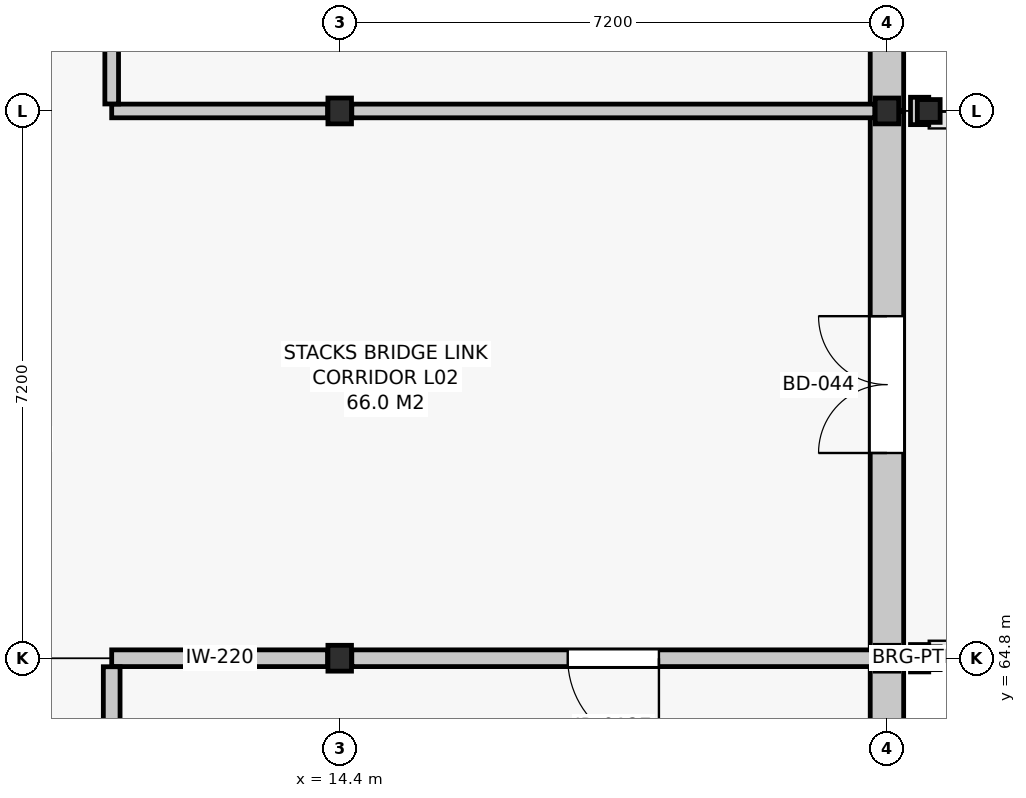
"""IFC4 building model, lengths in metres.
Left out: names, types, materials, properties, quantities, classifications, styles, units other than length and angle.
Written with IfcOpenShell. Run it as: python <this file> out.ifc"""

import sys

from ifc_helpers import new_model, si_unit, direction, frame, frame_2d, origin, origin_2d, place, context, subcontext, project, spatial, rectangle, i_section, extrude, element, fill, save


model = new_model("IFC4")
c1 = context("Model", 3, precision=1e-05, world=origin(), true_north=direction((0.0, 1.0)))
c2 = subcontext(c1, "Body", "Model", "MODEL_VIEW")
j1 = project(units=[si_unit("LENGTHUNIT", "METRE"), si_unit("PLANEANGLEUNIT", "RADIAN")], contexts=[c1])
p1 = place(None, origin())
s1 = spatial("IfcSite", under=j1, at=p1, CompositionType="ELEMENT")
p2 = place(p1, origin())
s2 = spatial("IfcBuilding", under=s1, at=p2, CompositionType="ELEMENT")
p3 = place(p2, frame((0.0, 0.0, 10.2)))
s3 = spatial("IfcBuildingStorey", under=s2, at=p3, CompositionType="ELEMENT", Elevation=10.2)
for number, where, z_axis, x_axis in (
    (1, (14.4, 64.8, 0.0), (0.0, 0.0, 1.0), (1.0, 0.0, 0.0)),
    (2, (14.4, 72.0, 0.0), (0.0, 0.0, 1.0), (1.0, 0.0, 0.0)),
    (3, (21.6, 64.8, 0.0), (0.0, 0.0, 1.0), (1.0, 0.0, 0.0)),
    (4, (21.6, 72.0, 0.0), (0.0, 0.0, 1.0), (1.0, 0.0, 0.0)),
):
    element("IfcColumn", number, at=place(p3, frame(where, z_axis=z_axis, x_axis=x_axis)), inside=s3, PredefinedType="COLUMN", context=c2, shape_type="SweptSolid", body=[
        extrude(i_section(OverallWidth=0.31, OverallDepth=0.34, WebThickness=0.021, FlangeThickness=0.035, FilletRadius=0.027, at=origin_2d()), origin(), (0.0, 0.0, 1.0), 4.2),
    ])
for number, where, z_axis, x_axis in (
    (5, (22.15, 64.8, 0.0), (0.0, 0.0, 1.0), (1.0, 0.0, 0.0)),
    (6, (22.15, 72.0, 0.0), (0.0, 0.0, 1.0), (1.0, 0.0, 0.0)),
):
    element("IfcColumn", number, at=place(p3, frame(where, z_axis=z_axis, x_axis=x_axis)), inside=s3, PredefinedType="COLUMN", context=c2, shape_type="SweptSolid", body=[
        extrude(i_section(OverallWidth=0.3, OverallDepth=0.3, WebThickness=0.011, FlangeThickness=0.019, FilletRadius=0.027, at=origin_2d()), origin(), (0.0, 0.0, 1.0), 4.2),
    ])
p4 = place(p3, frame((21.6, 57.6, 0.0), z_axis=(0.0, 0.0, 1.0), x_axis=(0.0, 1.0, 0.0)))
e7 = element("IfcWall", 7, at=p4, inside=s3, PredefinedType="SOLIDWALL", context=c2, shape_type="SweptSolid", body=[
    extrude(rectangle(XDim=7.2, YDim=0.44, at=frame_2d((3.6, 0.0))), origin(), (0.0, 0.0, 1.0), 3.18),
])
p5 = place(p4, frame((3.0, 0.0, 0.95)))
e8 = element("IfcOpeningElement", 8, at=p5, cuts=e7, PredefinedType="OPENING", context=c2, shape_type="SweptSolid", body=[
    extrude(rectangle(XDim=1.2, YDim=2.15, at=frame_2d((0.6, 1.075))), frame((0.0, 0.232, 0.0), z_axis=(0.0, -1.0, 0.0), x_axis=(1.0, 0.0, 0.0)), (0.0, 0.0, 1.0), 0.464),
])
p6 = place(p3, frame((21.6, 64.8, 0.0), z_axis=(0.0, 0.0, 1.0), x_axis=(0.0, 1.0, 0.0)))
e9 = element("IfcWall", 9, at=p6, inside=s3, PredefinedType="SOLIDWALL", context=c2, shape_type="SweptSolid", body=[
    extrude(rectangle(XDim=7.2, YDim=0.44, at=frame_2d((3.6, 0.0))), origin(), (0.0, 0.0, 1.0), 3.18),
])
p7 = place(p6, frame((2.7, 0.0, 0.0)))
e10 = element("IfcOpeningElement", 10, at=p7, cuts=e9, PredefinedType="OPENING", context=c2, shape_type="SweptSolid", body=[
    extrude(rectangle(XDim=1.8, YDim=2.3, at=frame_2d((0.9, 1.15))), frame((0.0, 0.232, 0.0), z_axis=(0.0, -1.0, 0.0), x_axis=(1.0, 0.0, 0.0)), (0.0, 0.0, 1.0), 0.464),
])
p8 = place(p3, frame((21.6, 72.0, 0.0), z_axis=(0.0, 0.0, 1.0), x_axis=(0.0, 1.0, 0.0)))
e11 = element("IfcWall", 11, at=p8, inside=s3, PredefinedType="SOLIDWALL", context=c2, shape_type="SweptSolid", body=[
    extrude(rectangle(XDim=7.2, YDim=0.44, at=frame_2d((3.6, 0.0))), origin(), (0.0, 0.0, 1.0), 3.18),
])
p9 = place(p8, frame((3.0, 0.0, 0.95)))
e12 = element("IfcOpeningElement", 12, at=p9, cuts=e11, PredefinedType="OPENING", context=c2, shape_type="SweptSolid", body=[
    extrude(rectangle(XDim=1.2, YDim=2.15, at=frame_2d((0.6, 1.075))), frame((0.0, 0.232, 0.0), z_axis=(0.0, -1.0, 0.0), x_axis=(1.0, 0.0, 0.0)), (0.0, 0.0, 1.0), 0.464),
])
p10 = place(p3, frame((11.4, 64.8, 0.0), z_axis=(0.0, 0.0, 1.0), x_axis=(1.0, 0.0, 0.0)))
e13 = element("IfcWall", 13, at=p10, inside=s3, PredefinedType="SOLIDWALL", context=c2, shape_type="SweptSolid", body=[
    extrude(rectangle(XDim=2.841, YDim=0.22, at=frame_2d((1.42, 0.0))), origin(), (0.0, 0.0, 1.0), 3.285),
])
p11 = place(p3, frame((14.559, 64.8, 0.0), z_axis=(0.0, 0.0, 1.0), x_axis=(1.0, 0.0, 0.0)))
e14 = element("IfcWall", 14, at=p11, inside=s3, PredefinedType="SOLIDWALL", context=c2, shape_type="SweptSolid", body=[
    extrude(rectangle(XDim=6.882, YDim=0.22, at=frame_2d((3.441, 0.0))), origin(), (0.0, 0.0, 1.0), 3.285),
])
p12 = place(p11, frame((2.841, 0.0, 0.0)))
e15 = element("IfcOpeningElement", 15, at=p12, cuts=e14, PredefinedType="OPENING", context=c2, shape_type="SweptSolid", body=[
    extrude(rectangle(XDim=1.2, YDim=2.2, at=frame_2d((0.6, 1.1))), frame((0.0, 0.122, 0.0), z_axis=(0.0, -1.0, 0.0), x_axis=(1.0, 0.0, 0.0)), (0.0, 0.0, 1.0), 0.244),
])
p13 = place(p3, frame((11.4, 72.0, 0.0), z_axis=(0.0, 0.0, 1.0), x_axis=(1.0, 0.0, 0.0)))
e16 = element("IfcWall", 16, at=p13, inside=s3, PredefinedType="PARTITIONING", context=c2, shape_type="SweptSolid", body=[
    extrude(rectangle(XDim=2.841, YDim=0.18, at=frame_2d((1.42, 0.0))), origin(), (0.0, 0.0, 1.0), 3.285),
])
p14 = place(p3, frame((14.559, 72.0, 0.0), z_axis=(0.0, 0.0, 1.0), x_axis=(1.0, 0.0, 0.0)))
e17 = element("IfcWall", 17, at=p14, inside=s3, PredefinedType="PARTITIONING", context=c2, shape_type="SweptSolid", body=[
    extrude(rectangle(XDim=6.882, YDim=0.18, at=frame_2d((3.441, 0.0))), origin(), (0.0, 0.0, 1.0), 3.285),
])
p15 = place(p3, frame((11.4, 28.855, 0.0), z_axis=(0.0, 0.0, 1.0), x_axis=(0.0, 1.0, 0.0)))
e18 = element("IfcWall", 18, at=p15, inside=s3, PredefinedType="SOLIDWALL", context=c2, shape_type="SweptSolid", body=[
    extrude(rectangle(XDim=35.833, YDim=0.22, at=frame_2d((17.917, 0.0))), origin(), (0.0, 0.0, 1.0), 3.285),
])
p16 = place(p15, frame((17.316, 0.0, 0.0)))
e19 = element("IfcOpeningElement", 19, at=p16, cuts=e18, PredefinedType="OPENING", context=c2, shape_type="SweptSolid", body=[
    extrude(rectangle(XDim=1.2, YDim=2.2, at=frame_2d((0.6, 1.1))), frame((0.0, 0.122, 0.0), z_axis=(0.0, -1.0, 0.0), x_axis=(1.0, 0.0, 0.0)), (0.0, 0.0, 1.0), 0.244),
])
p17 = place(p3, frame((11.4, 72.092, 0.0), z_axis=(0.0, 0.0, 1.0), x_axis=(0.0, 1.0, 0.0)))
e20 = element("IfcWall", 20, at=p17, inside=s3, PredefinedType="PARTITIONING", context=c2, shape_type="SweptSolid", body=[
    extrude(rectangle(XDim=24.216, YDim=0.18, at=frame_2d((12.108, 0.0))), origin(), (0.0, 0.0, 1.0), 3.285),
])
p18 = place(p17, frame((11.283, 0.0, 0.0)))
e21 = element("IfcOpeningElement", 21, at=p18, cuts=e20, PredefinedType="OPENING", context=c2, shape_type="SweptSolid", body=[
    extrude(rectangle(XDim=1.65, YDim=2.25, at=frame_2d((0.825, 1.125))), frame((0.0, 0.102, 0.0), z_axis=(0.0, -1.0, 0.0), x_axis=(1.0, 0.0, 0.0)), (0.0, 0.0, 1.0), 0.204),
])
p19 = place(p7, origin())
e22 = element("IfcDoor", 22, at=p19, inside=s3, OperationType="DOUBLE_DOOR_SINGLE_SWING", PredefinedType="DOOR", context=c2, shape_type="SweptSolid", body=[
    extrude(rectangle(XDim=1.8, YDim=2.3, at=frame_2d((0.9, 1.15))), frame((0.0, 0.025, 0.0), z_axis=(0.0, -1.0, 0.0), x_axis=(1.0, 0.0, 0.0)), (0.0, 0.0, 1.0), 0.05),
])
fill(e10, e22)
p20 = place(p12, frame((1.2, 0.0, 0.0), z_axis=(0.0, 0.0, 1.0), x_axis=(-1.0, 0.0, 0.0)))
e23 = element("IfcDoor", 23, at=p20, inside=s3, OperationType="SINGLE_SWING_LEFT", PredefinedType="DOOR", context=c2, shape_type="SweptSolid", body=[
    extrude(rectangle(XDim=1.2, YDim=2.2, at=frame_2d((0.6, 1.1))), frame((0.0, 0.025, 0.0), z_axis=(0.0, -1.0, 0.0), x_axis=(1.0, 0.0, 0.0)), (0.0, 0.0, 1.0), 0.05),
])
fill(e15, e23)
save(model, sys.argv[1])
